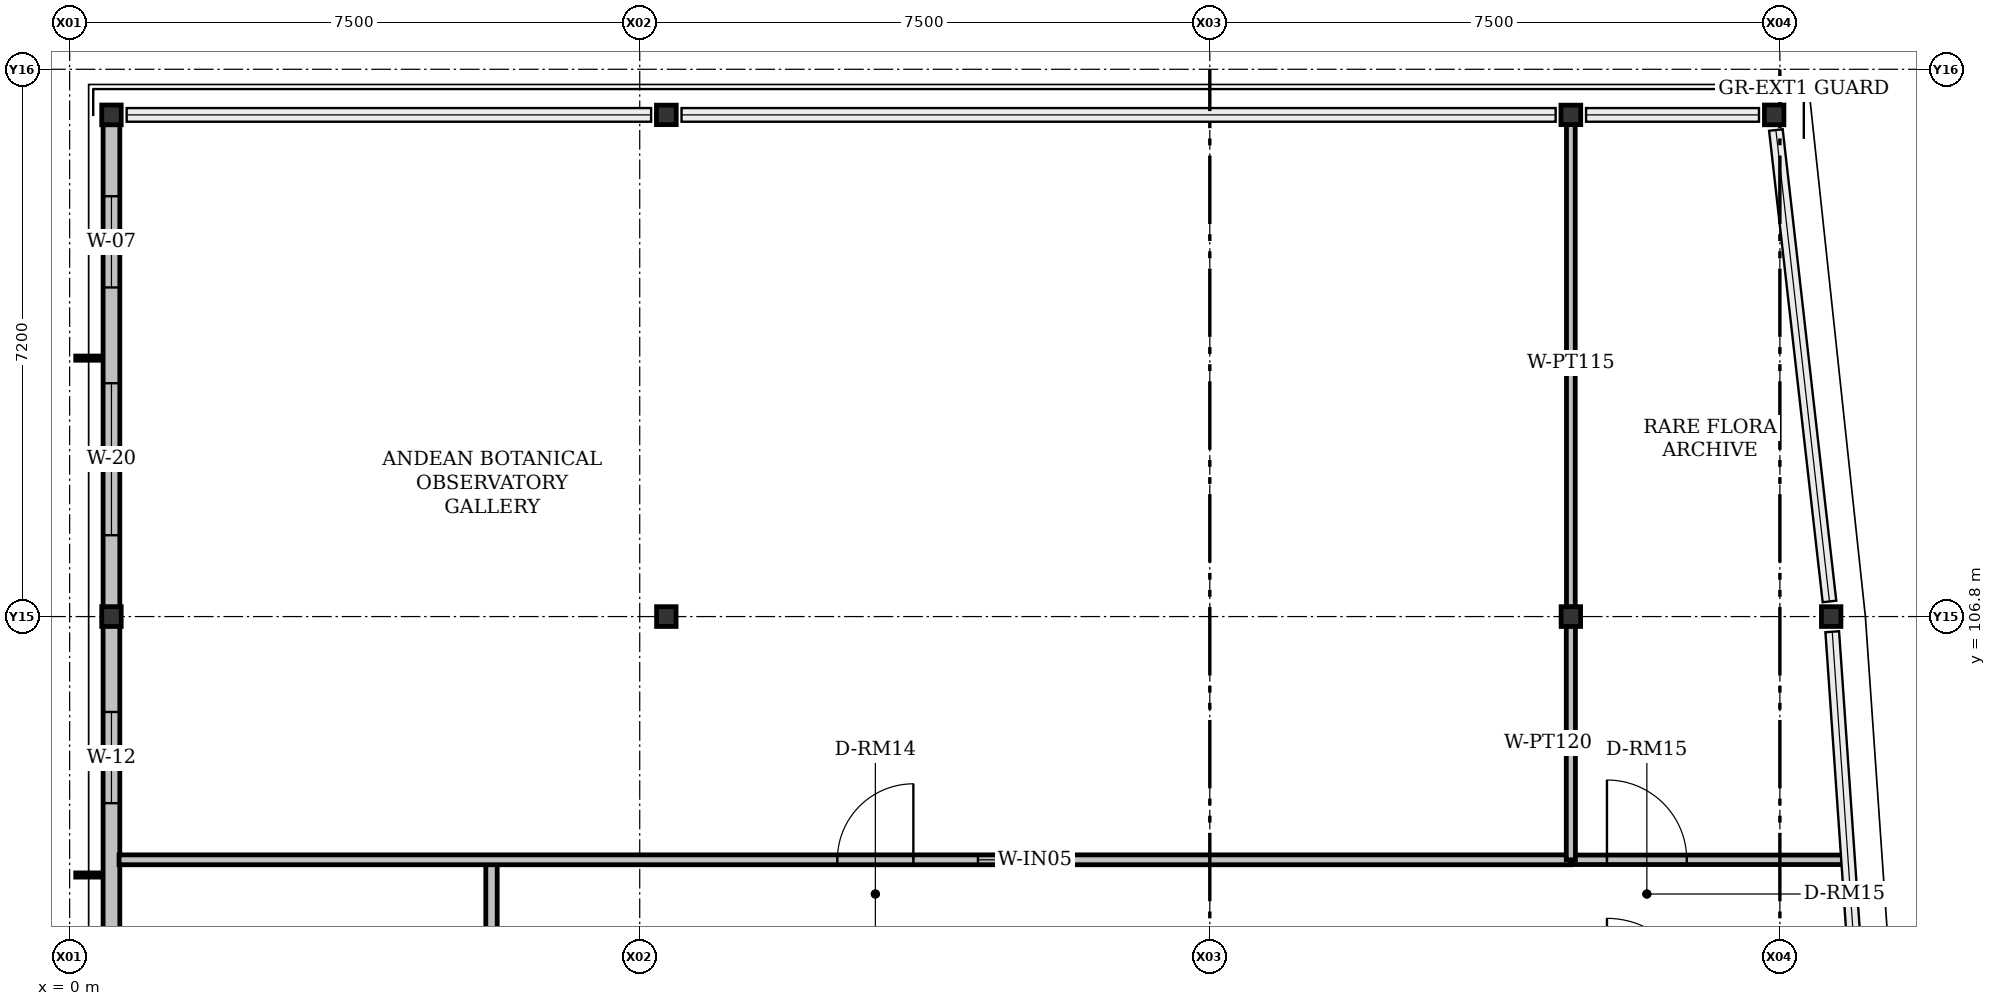
"""IFC4 building model, lengths in metres.
Left out: names, types, materials, properties, quantities, classifications, styles, units other than length and angle.
Written with IfcOpenShell. Run it as: python <this file> out.ifc"""

import sys

from ifc_helpers import new_model, si_unit, direction, frame, frame_2d, origin, origin_2d, place, context, subcontext, project, spatial, rectangle, i_section, extrude, element, fill, save


model = new_model("IFC4")
c1 = context("Model", 3, precision=1e-05, world=origin(), true_north=direction((0.0, 1.0)))
c2 = subcontext(c1, "Body", "Model", "MODEL_VIEW")
j1 = project(units=[si_unit("LENGTHUNIT", "METRE"), si_unit("PLANEANGLEUNIT", "RADIAN")], contexts=[c1])
p1 = place(None, origin())
s1 = spatial("IfcSite", under=j1, at=p1, CompositionType="ELEMENT")
p2 = place(p1, origin())
s2 = spatial("IfcBuilding", under=s1, at=p2, CompositionType="ELEMENT")
p3 = place(p2, frame((0.0, 0.0, 64.5)))
s3 = spatial("IfcBuildingStorey", under=s2, at=p3, CompositionType="ELEMENT", Elevation=64.5)
for number, where, z_axis, x_axis in (
    (1, (0.55, 106.8, 0.0), (0.0, 0.0, 1.0), (1.0, 0.0, 0.0)),
    (2, (7.85, 106.8, 0.0), (0.0, 0.0, 1.0), (1.0, 0.0, 0.0)),
    (3, (19.75, 106.8, 0.0), (0.0, 0.0, 1.0), (1.0, 0.0, 0.0)),
    (4, (23.175, 106.8, 0.0), (0.0, 0.0, 1.0), (1.0, 0.0, 0.0)),
    (5, (0.55, 113.4, 0.0), (0.0, 0.0, 1.0), (1.0, 0.0, 0.0)),
    (6, (7.85, 113.4, 0.0), (0.0, 0.0, 1.0), (0.0, 1.0, 0.0)),
    (7, (19.75, 113.4, 0.0), (0.0, 0.0, 1.0), (0.0, 1.0, 0.0)),
    (8, (22.425, 113.4, 0.0), (0.0, 0.0, 1.0), (1.0, 0.0, 0.0)),
):
    element("IfcColumn", number, at=place(p3, frame(where, z_axis=z_axis, x_axis=x_axis)), inside=s3, PredefinedType="COLUMN", context=c2, shape_type="SweptSolid", body=[
        extrude(i_section(OverallWidth=0.256, OverallDepth=0.26, WebThickness=0.011, FlangeThickness=0.017, FilletRadius=0.013, at=origin_2d()), origin(), (0.0, 0.0, 1.0), 4.2),
    ])
p4 = place(p3, frame((0.55, 99.6, 0.0), z_axis=(0.0, 0.0, 1.0), x_axis=(0.0, 1.0, 0.0)))
e9 = element("IfcWall", 9, at=p4, inside=s3, PredefinedType="SOLIDWALL", context=c2, shape_type="SweptSolid", body=[
    extrude(rectangle(XDim=7.2, YDim=0.22, at=frame_2d((3.6, 0.0))), origin(), (0.0, 0.0, 1.0), 3.562),
])
p5 = place(p4, frame((1.455, 0.0, 0.92)))
e10 = element("IfcOpeningElement", 10, at=p5, cuts=e9, PredefinedType="OPENING", context=c2, shape_type="SweptSolid", body=[
    extrude(rectangle(XDim=1.6, YDim=1.35, at=frame_2d((0.8, 0.675))), frame((0.0, 0.11, 0.0), z_axis=(0.0, -1.0, 0.0), x_axis=(1.0, 0.0, 0.0)), (0.0, 0.0, 1.0), 0.22),
])
p6 = place(p4, frame((4.745, 0.0, 0.92)))
e11 = element("IfcOpeningElement", 11, at=p6, cuts=e9, PredefinedType="OPENING", context=c2, shape_type="SweptSolid", body=[
    extrude(rectangle(XDim=1.2, YDim=1.7, at=frame_2d((0.6, 0.85))), frame((0.0, 0.11, 0.0), z_axis=(0.0, -1.0, 0.0), x_axis=(1.0, 0.0, 0.0)), (0.0, 0.0, 1.0), 0.22),
])
p7 = place(p3, frame((0.55, 106.8, 0.0), z_axis=(0.0, 0.0, 1.0), x_axis=(0.0, 1.0, 0.0)))
e12 = element("IfcWall", 12, at=p7, inside=s3, PredefinedType="SOLIDWALL", context=c2, shape_type="SweptSolid", body=[
    extrude(rectangle(XDim=6.6, YDim=0.22, at=frame_2d((3.3, 0.0))), origin(), (0.0, 0.0, 1.0), 3.562),
])
p8 = place(p7, frame((1.07, 0.0, 0.92)))
e13 = element("IfcOpeningElement", 13, at=p8, cuts=e12, PredefinedType="OPENING", context=c2, shape_type="SweptSolid", body=[
    extrude(rectangle(XDim=2.0, YDim=1.35, at=frame_2d((1.0, 0.675))), frame((0.0, 0.11, 0.0), z_axis=(0.0, -1.0, 0.0), x_axis=(1.0, 0.0, 0.0)), (0.0, 0.0, 1.0), 0.22),
])
p9 = place(p7, frame((4.33, 0.0, 0.92)))
e14 = element("IfcOpeningElement", 14, at=p9, cuts=e12, PredefinedType="OPENING", context=c2, shape_type="SweptSolid", body=[
    extrude(rectangle(XDim=1.2, YDim=1.55, at=frame_2d((0.6, 0.775))), frame((0.0, 0.11, 0.0), z_axis=(0.0, -1.0, 0.0), x_axis=(1.0, 0.0, 0.0)), (0.0, 0.0, 1.0), 0.22),
])
p10 = place(p3, frame((5.55, 92.4, 0.0), z_axis=(0.0, 0.0, 1.0), x_axis=(0.0, 1.0, 0.0)))
e15 = element("IfcWall", 15, at=p10, inside=s3, PredefinedType="PARTITIONING", context=c2, shape_type="SweptSolid", body=[
    extrude(rectangle(XDim=11.2, YDim=0.15, at=frame_2d((5.6, 0.0))), origin(), (0.0, 0.0, 1.0), 3.436),
])
p11 = place(p10, frame((4.875, 0.0, 0.0)))
e16 = element("IfcOpeningElement", 16, at=p11, cuts=e15, PredefinedType="OPENING", context=c2, shape_type="SweptSolid", body=[
    extrude(rectangle(XDim=1.45, YDim=2.2, at=frame_2d((0.725, 1.1))), frame((0.0, 0.075, 0.0), z_axis=(0.0, -1.0, 0.0), x_axis=(1.0, 0.0, 0.0)), (0.0, 0.0, 1.0), 0.15),
])
p12 = place(p10, frame((7.175, 0.0, 0.92)))
e17 = element("IfcOpeningElement", 17, at=p12, cuts=e15, PredefinedType="OPENING", context=c2, shape_type="SweptSolid", body=[
    extrude(rectangle(XDim=1.25, YDim=1.1, at=frame_2d((0.625, 0.55))), frame((0.0, 0.075, 0.0), z_axis=(0.0, -1.0, 0.0), x_axis=(1.0, 0.0, 0.0)), (0.0, 0.0, 1.0), 0.15),
])
p13 = place(p3, frame((0.65, 103.6, 0.0), z_axis=(0.0, 0.0, 1.0), x_axis=(1.0, 0.0, 0.0)))
e18 = element("IfcWall", 18, at=p13, inside=s3, PredefinedType="PARTITIONING", context=c2, shape_type="SweptSolid", body=[
    extrude(rectangle(XDim=19.1, YDim=0.13, at=frame_2d((9.55, 0.0))), origin(), (0.0, 0.0, 1.0), 3.512),
])
p14 = place(p13, frame((9.45, 0.0, 0.0)))
e19 = element("IfcOpeningElement", 19, at=p14, cuts=e18, PredefinedType="OPENING", context=c2, shape_type="SweptSolid", body=[
    extrude(rectangle(XDim=1.0, YDim=2.2, at=frame_2d((0.5, 1.1))), frame((0.0, 0.065, 0.0), z_axis=(0.0, -1.0, 0.0), x_axis=(1.0, 0.0, 0.0)), (0.0, 0.0, 1.0), 0.13),
])
p15 = place(p13, frame((11.3, 0.0, 0.92)))
e20 = element("IfcOpeningElement", 20, at=p15, cuts=e18, PredefinedType="OPENING", context=c2, shape_type="SweptSolid", body=[
    extrude(rectangle(XDim=0.9, YDim=1.2, at=frame_2d((0.45, 0.6))), frame((0.0, 0.065, 0.0), z_axis=(0.0, -1.0, 0.0), x_axis=(1.0, 0.0, 0.0)), (0.0, 0.0, 1.0), 0.13),
])
p16 = place(p3, frame((19.75, 103.6, 0.0), z_axis=(0.0, 0.0, 1.0), x_axis=(1.0, 0.0, 0.0)))
e21 = element("IfcWall", 21, at=p16, inside=s3, PredefinedType="PARTITIONING", context=c2, shape_type="SweptSolid", body=[
    extrude(rectangle(XDim=3.665, YDim=0.125, at=frame_2d((1.833, 0.0))), origin(), (0.0, 0.0, 1.0), 3.512),
])
p17 = place(p16, frame((0.475, 0.0, 0.0)))
e22 = element("IfcOpeningElement", 22, at=p17, cuts=e21, PredefinedType="OPENING", context=c2, shape_type="SweptSolid", body=[
    extrude(rectangle(XDim=1.05, YDim=2.2, at=frame_2d((0.525, 1.1))), frame((0.0, 0.062, 0.0), z_axis=(0.0, -1.0, 0.0), x_axis=(1.0, 0.0, 0.0)), (0.0, 0.0, 1.0), 0.125),
])
p18 = place(p3, frame((19.75, 106.675, 0.0), z_axis=(0.0, 0.0, 1.0), x_axis=(0.0, -1.0, 0.0)))
e23 = element("IfcWall", 23, at=p18, inside=s3, PredefinedType="PARTITIONING", context=c2, shape_type="SweptSolid", body=[
    extrude(rectangle(XDim=3.075, YDim=0.12, at=frame_2d((1.538, 0.0))), origin(), (0.0, 0.0, 1.0), 3.512),
])
p19 = place(p3, frame((19.75, 113.35, 0.0), z_axis=(0.0, 0.0, 1.0), x_axis=(0.0, -1.0, 0.0)))
e24 = element("IfcWall", 24, at=p19, inside=s3, PredefinedType="PARTITIONING", context=c2, shape_type="SweptSolid", body=[
    extrude(rectangle(XDim=6.425, YDim=0.115, at=frame_2d((3.212, 0.0))), origin(), (0.0, 0.0, 1.0), 3.512),
])
p20 = place(p6, origin())
e25 = element("IfcWindow", 25, at=p20, inside=s3, PartitioningType="SINGLE_PANEL", PredefinedType="WINDOW", context=c2, shape_type="SweptSolid", body=[
    extrude(rectangle(XDim=1.2, YDim=1.7, at=frame_2d((0.6, 0.85))), frame((0.0, 0.03, 0.0), z_axis=(0.0, -1.0, 0.0), x_axis=(1.0, 0.0, 0.0)), (0.0, 0.0, 1.0), 0.06),
])
fill(e11, e25)
p21 = place(p8, origin())
e26 = element("IfcWindow", 26, at=p21, inside=s3, PartitioningType="DOUBLE_PANEL_VERTICAL", PredefinedType="WINDOW", context=c2, shape_type="SweptSolid", body=[
    extrude(rectangle(XDim=2.0, YDim=1.35, at=frame_2d((1.0, 0.675))), frame((0.0, 0.03, 0.0), z_axis=(0.0, -1.0, 0.0), x_axis=(1.0, 0.0, 0.0)), (0.0, 0.0, 1.0), 0.06),
])
fill(e13, e26)
p22 = place(p9, origin())
e27 = element("IfcWindow", 27, at=p22, inside=s3, PartitioningType="SINGLE_PANEL", PredefinedType="WINDOW", context=c2, shape_type="SweptSolid", body=[
    extrude(rectangle(XDim=1.2, YDim=1.55, at=frame_2d((0.6, 0.775))), frame((0.0, 0.03, 0.0), z_axis=(0.0, -1.0, 0.0), x_axis=(1.0, 0.0, 0.0)), (0.0, 0.0, 1.0), 0.06),
])
fill(e14, e27)
p23 = place(p14, origin())
e28 = element("IfcDoor", 28, at=p23, inside=s3, OperationType="SINGLE_SWING_RIGHT", PredefinedType="DOOR", context=c2, shape_type="SweptSolid", body=[
    extrude(rectangle(XDim=1.0, YDim=2.2, at=frame_2d((0.5, 1.1))), frame((0.0, 0.025, 0.0), z_axis=(0.0, -1.0, 0.0), x_axis=(1.0, 0.0, 0.0)), (0.0, 0.0, 1.0), 0.05),
])
fill(e19, e28)
p24 = place(p15, origin())
e29 = element("IfcWindow", 29, at=p24, inside=s3, PartitioningType="SINGLE_PANEL", PredefinedType="WINDOW", context=c2, shape_type="SweptSolid", body=[
    extrude(rectangle(XDim=0.9, YDim=1.2, at=frame_2d((0.45, 0.6))), frame((0.0, 0.03, 0.0), z_axis=(0.0, -1.0, 0.0), x_axis=(1.0, 0.0, 0.0)), (0.0, 0.0, 1.0), 0.06),
])
fill(e20, e29)
p25 = place(p17, origin())
e30 = element("IfcDoor", 30, at=p25, inside=s3, OperationType="SINGLE_SWING_LEFT", PredefinedType="DOOR", context=c2, shape_type="SweptSolid", body=[
    extrude(rectangle(XDim=1.05, YDim=2.2, at=frame_2d((0.525, 1.1))), frame((0.0, 0.025, 0.0), z_axis=(0.0, -1.0, 0.0), x_axis=(1.0, 0.0, 0.0)), (0.0, 0.0, 1.0), 0.05),
])
fill(e22, e30)
save(model, sys.argv[1])
